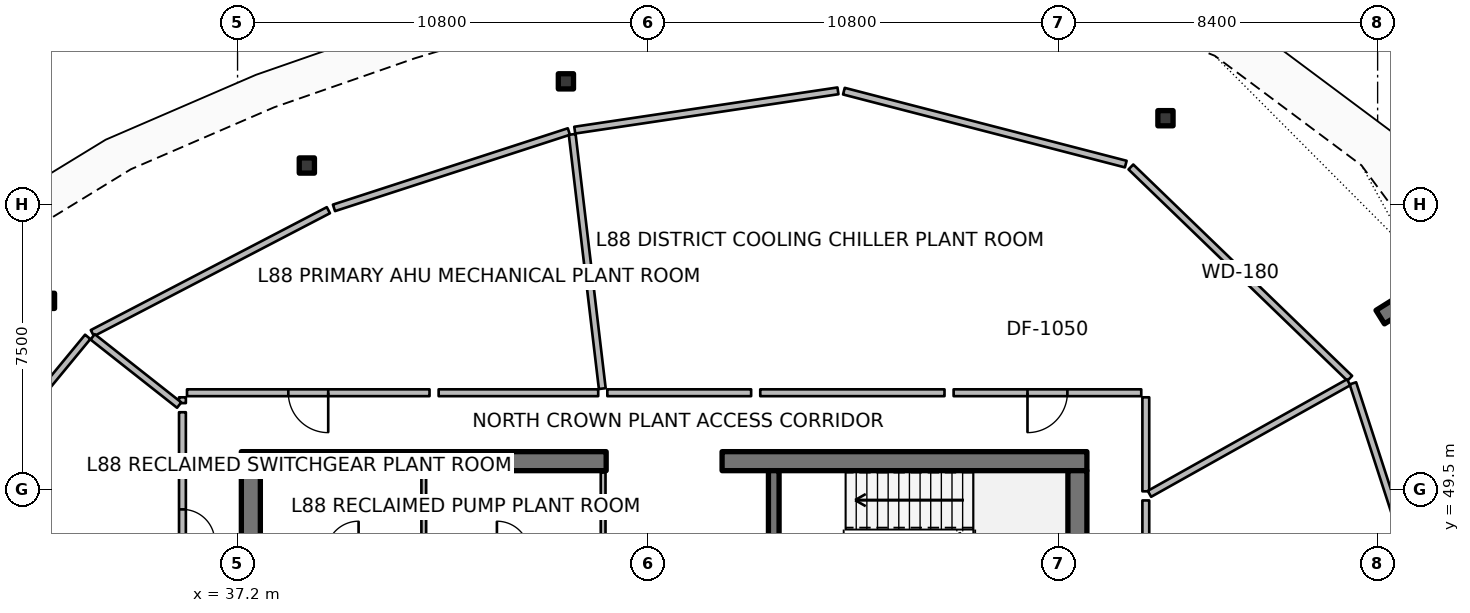
"""IFC4 building model, lengths in metres.
Left out: names, types, materials, properties, quantities, classifications, styles, units other than length and angle.
Written with IfcOpenShell. Run it as: python <this file> out.ifc"""

import sys

from ifc_helpers import new_model, si_unit, direction, frame, frame_2d, origin, origin_2d, place, context, subcontext, project, spatial, rectangle, hollow_rectangle, extrude, element, fill, save


model = new_model("IFC4")
c1 = context("Model", 3, precision=1e-05, world=origin(), true_north=direction((0.0, 1.0)))
c2 = subcontext(c1, "Body", "Model", "MODEL_VIEW")
j1 = project(units=[si_unit("LENGTHUNIT", "METRE"), si_unit("PLANEANGLEUNIT", "RADIAN")], contexts=[c1])
p1 = place(None, origin())
s1 = spatial("IfcSite", under=j1, at=p1, CompositionType="ELEMENT")
p2 = place(p1, origin())
s2 = spatial("IfcBuilding", under=s1, at=p2, CompositionType="ELEMENT")
p3 = place(p2, frame((0.0, 0.0, 351.5)))
s3 = spatial("IfcBuildingStorey", under=s2, at=p3, CompositionType="ELEMENT", Elevation=351.5)
p4 = place(p3, frame((37.3, 50.25, 0.0), z_axis=(0.0, 0.0, 1.0), x_axis=(1.0, 0.0, 0.0)))
e1 = element("IfcWall", 1, at=p4, inside=s3, PredefinedType="SHEAR", context=c2, shape_type="SweptSolid", body=[
    extrude(rectangle(XDim=9.6, YDim=0.5, at=frame_2d((4.8, 0.0))), origin(), (0.0, 0.0, 1.0), 4.5),
])
p5 = place(p3, frame((49.95, 50.25, 0.0), z_axis=(0.0, 0.0, 1.0), x_axis=(1.0, 0.0, 0.0)))
e2 = element("IfcWall", 2, at=p5, inside=s3, PredefinedType="SHEAR", context=c2, shape_type="SweptSolid", body=[
    extrude(rectangle(XDim=9.6, YDim=0.5, at=frame_2d((4.8, 0.0))), origin(), (0.0, 0.0, 1.0), 4.5),
])
for number, where, z_axis, x_axis in (
    (3, (37.55, 34.0, 0.0), (0.0, 0.0, 1.0), (0.0, 1.0, 0.0)),
    (4, (59.3, 34.0, 0.0), (0.0, 0.0, 1.0), (0.0, 1.0, 0.0)),
):
    element("IfcWall", number, at=place(p3, frame(where, z_axis=z_axis, x_axis=x_axis)), inside=s3, PredefinedType="SHEAR", context=c2, shape_type="SweptSolid", body=[
        extrude(rectangle(XDim=16.0, YDim=0.5, at=frame_2d((8.0, 0.0))), origin(), (0.0, 0.0, 1.0), 4.5),
    ])
p6 = place(p3, frame((51.31, 46.5, 0.0), z_axis=(0.0, 0.0, 1.0), x_axis=(0.0, 1.0, 0.0)))
e5 = element("IfcWall", 5, at=p6, inside=s3, PredefinedType="SHEAR", context=c2, shape_type="SweptSolid", body=[
    extrude(rectangle(XDim=3.5, YDim=0.28, at=frame_2d((1.75, 0.0))), origin(), (0.0, 0.0, 1.0), 4.5),
])
p7 = place(p3, frame((67.269, 54.041, 0.0), z_axis=(0.0, 0.0, 1.0), x_axis=(0.848033572426, 0.529942506352, 0.0)))
e6 = element("IfcWall", 6, at=p7, inside=s3, PredefinedType="SOLIDWALL", context=c2, shape_type="SweptSolid", body=[
    extrude(rectangle(XDim=3.5, YDim=0.42, at=frame_2d((1.75, 0.0))), origin(), (0.0, 0.0, 1.0), 4.5),
])
for number, where, z_axis, x_axis in (
    (7, (61.617, 59.274, 0.0), (0.0, 0.0, 1.0), (1.0, 0.0, 0.0)),
    (8, (45.841, 60.244, 0.0), (0.0, 0.0, 1.0), (1.0, 0.0, 0.0)),
    (9, (39.023, 58.029, 0.0), (0.0, 0.0, 1.0), (1.0, 0.0, 0.0)),
    (10, (32.185, 54.468, 0.0), (0.0, 0.0, 1.0), (1.0, 0.0, 0.0)),
):
    element("IfcColumn", number, at=place(p3, frame(where, z_axis=z_axis, x_axis=x_axis)), inside=s3, PredefinedType="COLUMN", context=c2, shape_type="SweptSolid", body=[
        extrude(hollow_rectangle(XDim=0.4, YDim=0.4, WallThickness=0.02, InnerFilletRadius=0.02, OuterFilletRadius=0.04, at=origin_2d()), origin(), (0.0, 0.0, 1.0), 4.22),
    ])
for number, where, z_axis, x_axis in (
    (11, (46.82, 47.92, 0.0), (0.0, 0.0, 1.0), (0.0, 1.0, 0.0)),
    (12, (42.1, 47.92, 0.0), (0.0, 0.0, 1.0), (0.0, 1.0, 0.0)),
):
    element("IfcWall", number, at=place(p3, frame(where, z_axis=z_axis, x_axis=x_axis)), inside=s3, PredefinedType="PARTITIONING", context=c2, shape_type="SweptSolid", body=[
        extrude(rectangle(XDim=2.03, YDim=0.125, at=frame_2d((1.015, 0.0))), origin(), (0.0, 0.0, 1.0), 3.66),
    ])
p8 = place(p3, frame((66.467, 52.43, 0.0), z_axis=(0.0, 0.0, 1.0), x_axis=(-0.719364153135, 0.694633151516, 0.0)))
e13 = element("IfcWall", 13, at=p8, inside=s3, PredefinedType="PARTITIONING", context=c2, shape_type="SweptSolid", body=[
    extrude(rectangle(XDim=8.006, YDim=0.18, at=frame_2d((4.003, 0.0))), origin(), (0.0, 0.0, 1.0), 3.213),
])
p9 = place(p3, frame((60.573, 58.066, 0.0), z_axis=(0.0, 0.0, 1.0), x_axis=(-0.968117205342, 0.250497658115, 0.0)))
e14 = element("IfcWall", 14, at=p9, inside=s3, PredefinedType="PARTITIONING", context=c2, shape_type="SweptSolid", body=[
    extrude(rectangle(XDim=7.662, YDim=0.18, at=frame_2d((3.831, 0.0))), origin(), (0.0, 0.0, 1.0), 3.213),
])
p10 = place(p3, frame((52.999, 59.994, 0.0), z_axis=(0.0, 0.0, 1.0), x_axis=(-0.989034336252, -0.147685753256, 0.0)))
e15 = element("IfcWall", 15, at=p10, inside=s3, PredefinedType="PARTITIONING", context=c2, shape_type="SweptSolid", body=[
    extrude(rectangle(XDim=7.003, YDim=0.18, at=frame_2d((3.501, 0.0))), origin(), (0.0, 0.0, 1.0), 3.213),
])
p11 = place(p3, frame((45.918, 58.923, 0.0), z_axis=(0.0, 0.0, 1.0), x_axis=(-0.95105283999, -0.309028308649, 0.0)))
e16 = element("IfcWall", 16, at=p11, inside=s3, PredefinedType="PARTITIONING", context=c2, shape_type="SweptSolid", body=[
    extrude(rectangle(XDim=6.499, YDim=0.18, at=frame_2d((3.25, 0.0))), origin(), (0.0, 0.0, 1.0), 3.213),
])
p12 = place(p3, frame((39.59, 56.853, 0.0), z_axis=(0.0, 0.0, 1.0), x_axis=(-0.886949494865, -0.461866423935, 0.0)))
e17 = element("IfcWall", 17, at=p12, inside=s3, PredefinedType="PARTITIONING", context=c2, shape_type="SweptSolid", body=[
    extrude(rectangle(XDim=7.002, YDim=0.18, at=frame_2d((3.501, 0.0))), origin(), (0.0, 0.0, 1.0), 3.213),
])
p13 = place(p3, frame((33.258, 53.52, 0.0), z_axis=(0.0, 0.0, 1.0), x_axis=(-0.636018833443, -0.771673534278, 0.0)))
e18 = element("IfcWall", 18, at=p13, inside=s3, PredefinedType="PARTITIONING", context=c2, shape_type="SweptSolid", body=[
    extrude(rectangle(XDim=7.661, YDim=0.18, at=frame_2d((3.831, 0.0))), origin(), (0.0, 0.0, 1.0), 3.213),
])
p14 = place(p3, frame((69.059, 44.572, 0.0), z_axis=(0.0, 0.0, 1.0), x_axis=(-0.309024234991, 0.951054163646, 0.0)))
e19 = element("IfcWall", 19, at=p14, inside=s3, PredefinedType="PARTITIONING", context=c2, shape_type="SweptSolid", body=[
    extrude(rectangle(XDim=8.124, YDim=0.18, at=frame_2d((4.062, 0.0))), origin(), (0.0, 0.0, 1.0), 3.213),
])
p15 = place(p3, frame((61.1, 49.456, 0.0), z_axis=(0.0, 0.0, 1.0), x_axis=(0.0, 1.0, 0.0)))
e20 = element("IfcWall", 20, at=p15, inside=s3, PredefinedType="PARTITIONING", context=c2, shape_type="SweptSolid", body=[
    extrude(rectangle(XDim=2.474, YDim=0.18, at=frame_2d((1.237, 0.0))), origin(), (0.0, 0.0, 1.0), 3.213),
])
p16 = place(p3, frame((60.98, 52.05, 0.0), z_axis=(0.0, 0.0, 1.0), x_axis=(-1.0, 0.0, 0.0)))
e21 = element("IfcWall", 21, at=p16, inside=s3, PredefinedType="PARTITIONING", context=c2, shape_type="SweptSolid", body=[
    extrude(rectangle(XDim=4.937, YDim=0.18, at=frame_2d((2.469, 0.0))), origin(), (0.0, 0.0, 1.0), 3.213),
])
p17 = place(p16, frame((1.944, 0.0, 0.0)))
e22 = element("IfcOpeningElement", 22, at=p17, cuts=e21, PredefinedType="OPENING", context=c2, shape_type="SweptSolid", body=[
    extrude(rectangle(XDim=1.05, YDim=2.1, at=frame_2d((0.525, 1.05))), frame((0.0, 0.1, 0.0), z_axis=(0.0, -1.0, 0.0), x_axis=(1.0, 0.0, 0.0)), (0.0, 0.0, 1.0), 0.2),
])
p18 = place(p3, frame((55.803, 52.05, 0.0), z_axis=(0.0, 0.0, 1.0), x_axis=(-1.0, 0.0, 0.0)))
e23 = element("IfcWall", 23, at=p18, inside=s3, PredefinedType="PARTITIONING", context=c2, shape_type="SweptSolid", body=[
    extrude(rectangle(XDim=4.848, YDim=0.18, at=frame_2d((2.424, 0.0))), origin(), (0.0, 0.0, 1.0), 3.213),
])
p19 = place(p3, frame((50.714, 52.05, 0.0), z_axis=(0.0, 0.0, 1.0), x_axis=(-1.0, 0.0, 0.0)))
e24 = element("IfcWall", 24, at=p19, inside=s3, PredefinedType="PARTITIONING", context=c2, shape_type="SweptSolid", body=[
    extrude(rectangle(XDim=3.784, YDim=0.18, at=frame_2d((1.892, 0.0))), origin(), (0.0, 0.0, 1.0), 3.213),
])
p20 = place(p3, frame((61.196, 49.39, 0.0), z_axis=(0.0, 0.0, 1.0), x_axis=(0.87249769897, 0.488618220385, 0.0)))
e25 = element("IfcWall", 25, at=p20, inside=s3, PredefinedType="PARTITIONING", context=c2, shape_type="SweptSolid", body=[
    extrude(rectangle(XDim=6.007, YDim=0.18, at=frame_2d((3.003, 0.0))), origin(), (0.0, 0.0, 1.0), 3.213),
])
p21 = place(p3, frame((46.798, 52.159, 0.0), z_axis=(0.0, 0.0, 1.0), x_axis=(-0.117541495417, 0.993067971921, 0.0)))
e26 = element("IfcWall", 26, at=p21, inside=s3, PredefinedType="PARTITIONING", context=c2, shape_type="SweptSolid", body=[
    extrude(rectangle(XDim=6.736, YDim=0.18, at=frame_2d((3.368, 0.0))), origin(), (0.0, 0.0, 1.0), 3.213),
])
p22 = place(p3, frame((46.69, 52.05, 0.0), z_axis=(0.0, 0.0, 1.0), x_axis=(-1.0, 0.0, 0.0)))
e27 = element("IfcWall", 27, at=p22, inside=s3, PredefinedType="PARTITIONING", context=c2, shape_type="SweptSolid", body=[
    extrude(rectangle(XDim=4.199, YDim=0.18, at=frame_2d((2.099, 0.0))), origin(), (0.0, 0.0, 1.0), 3.213),
])
p23 = place(p3, frame((42.252, 52.05, 0.0), z_axis=(0.0, 0.0, 1.0), x_axis=(-1.0, 0.0, 0.0)))
e28 = element("IfcWall", 28, at=p23, inside=s3, PredefinedType="PARTITIONING", context=c2, shape_type="SweptSolid", body=[
    extrude(rectangle(XDim=6.382, YDim=0.18, at=frame_2d((3.191, 0.0))), origin(), (0.0, 0.0, 1.0), 3.213),
])
p24 = place(p23, frame((2.666, 0.0, 0.0)))
e29 = element("IfcOpeningElement", 29, at=p24, cuts=e28, PredefinedType="OPENING", context=c2, shape_type="SweptSolid", body=[
    extrude(rectangle(XDim=1.05, YDim=2.1, at=frame_2d((0.525, 1.05))), frame((0.0, 0.1, 0.0), z_axis=(0.0, -1.0, 0.0), x_axis=(1.0, 0.0, 0.0)), (0.0, 0.0, 1.0), 0.2),
])
p25 = place(p3, frame((35.75, 51.93, 0.0), z_axis=(0.0, 0.0, 1.0), x_axis=(0.0, -1.0, 0.0)))
e30 = element("IfcWall", 30, at=p25, inside=s3, PredefinedType="PARTITIONING", context=c2, shape_type="SweptSolid", body=[
    extrude(rectangle(XDim=0.153, YDim=0.18, at=frame_2d((0.076, 0.0))), origin(), (0.0, 0.0, 1.0), 3.213),
])
p26 = place(p3, frame((35.664, 51.725, 0.0), z_axis=(0.0, 0.0, 1.0), x_axis=(-0.78528570066, 0.619133562601, 0.0)))
e31 = element("IfcWall", 31, at=p26, inside=s3, PredefinedType="PARTITIONING", context=c2, shape_type="SweptSolid", body=[
    extrude(rectangle(XDim=2.899, YDim=0.18, at=frame_2d((1.45, 0.0))), origin(), (0.0, 0.0, 1.0), 3.213),
])
p27 = place(p3, frame((35.75, 51.537, 0.0), z_axis=(0.0, 0.0, 1.0), x_axis=(0.0, -1.0, 0.0)))
e32 = element("IfcWall", 32, at=p27, inside=s3, PredefinedType="PARTITIONING", context=c2, shape_type="SweptSolid", body=[
    extrude(rectangle(XDim=5.962, YDim=0.18, at=frame_2d((2.981, 0.0))), origin(), (0.0, 0.0, 1.0), 3.213),
])
p28 = place(p27, frame((2.556, 0.0, 0.0)))
e33 = element("IfcOpeningElement", 33, at=p28, cuts=e32, PredefinedType="OPENING", context=c2, shape_type="SweptSolid", body=[
    extrude(rectangle(XDim=0.85, YDim=2.06, at=frame_2d((0.425, 1.03))), frame((0.0, 0.1, 0.0), z_axis=(0.0, -1.0, 0.0), x_axis=(1.0, 0.0, 0.0)), (0.0, 0.0, 1.0), 0.2),
])
p29 = place(p3, frame((61.1, 43.67, 0.0), z_axis=(0.0, 0.0, 1.0), x_axis=(0.0, 1.0, 0.0)))
e34 = element("IfcWall", 34, at=p29, inside=s3, PredefinedType="PARTITIONING", context=c2, shape_type="SweptSolid", body=[
    extrude(rectangle(XDim=5.546, YDim=0.18, at=frame_2d((2.773, 0.0))), origin(), (0.0, 0.0, 1.0), 3.213),
])
p30 = place(p29, frame((2.348, 0.0, 0.0)))
e35 = element("IfcOpeningElement", 35, at=p30, cuts=e34, PredefinedType="OPENING", context=c2, shape_type="SweptSolid", body=[
    extrude(rectangle(XDim=0.85, YDim=2.06, at=frame_2d((0.425, 1.03))), frame((0.0, 0.1, 0.0), z_axis=(0.0, -1.0, 0.0), x_axis=(1.0, 0.0, 0.0)), (0.0, 0.0, 1.0), 0.2),
])
p31 = place(p17, origin())
e36 = element("IfcDoor", 36, at=p31, inside=s3, OperationType="SINGLE_SWING_RIGHT", PredefinedType="DOOR", context=c2, shape_type="SweptSolid", body=[
    extrude(rectangle(XDim=1.05, YDim=2.1, at=frame_2d((0.525, 1.05))), frame((0.0, 0.025, 0.0), z_axis=(0.0, -1.0, 0.0), x_axis=(1.0, 0.0, 0.0)), (0.0, 0.0, 1.0), 0.05),
])
fill(e22, e36)
p32 = place(p24, origin())
e37 = element("IfcDoor", 37, at=p32, inside=s3, OperationType="SINGLE_SWING_LEFT", PredefinedType="DOOR", context=c2, shape_type="SweptSolid", body=[
    extrude(rectangle(XDim=1.05, YDim=2.1, at=frame_2d((0.525, 1.05))), frame((0.0, 0.025, 0.0), z_axis=(0.0, -1.0, 0.0), x_axis=(1.0, 0.0, 0.0)), (0.0, 0.0, 1.0), 0.05),
])
fill(e29, e37)
p33 = place(p28, origin())
e38 = element("IfcDoor", 38, at=p33, inside=s3, OperationType="SINGLE_SWING_RIGHT", PredefinedType="DOOR", context=c2, shape_type="SweptSolid", body=[
    extrude(rectangle(XDim=0.85, YDim=2.06, at=frame_2d((0.425, 1.03))), frame((0.0, 0.025, 0.0), z_axis=(0.0, -1.0, 0.0), x_axis=(1.0, 0.0, 0.0)), (0.0, 0.0, 1.0), 0.05),
])
fill(e33, e38)
save(model, sys.argv[1])
